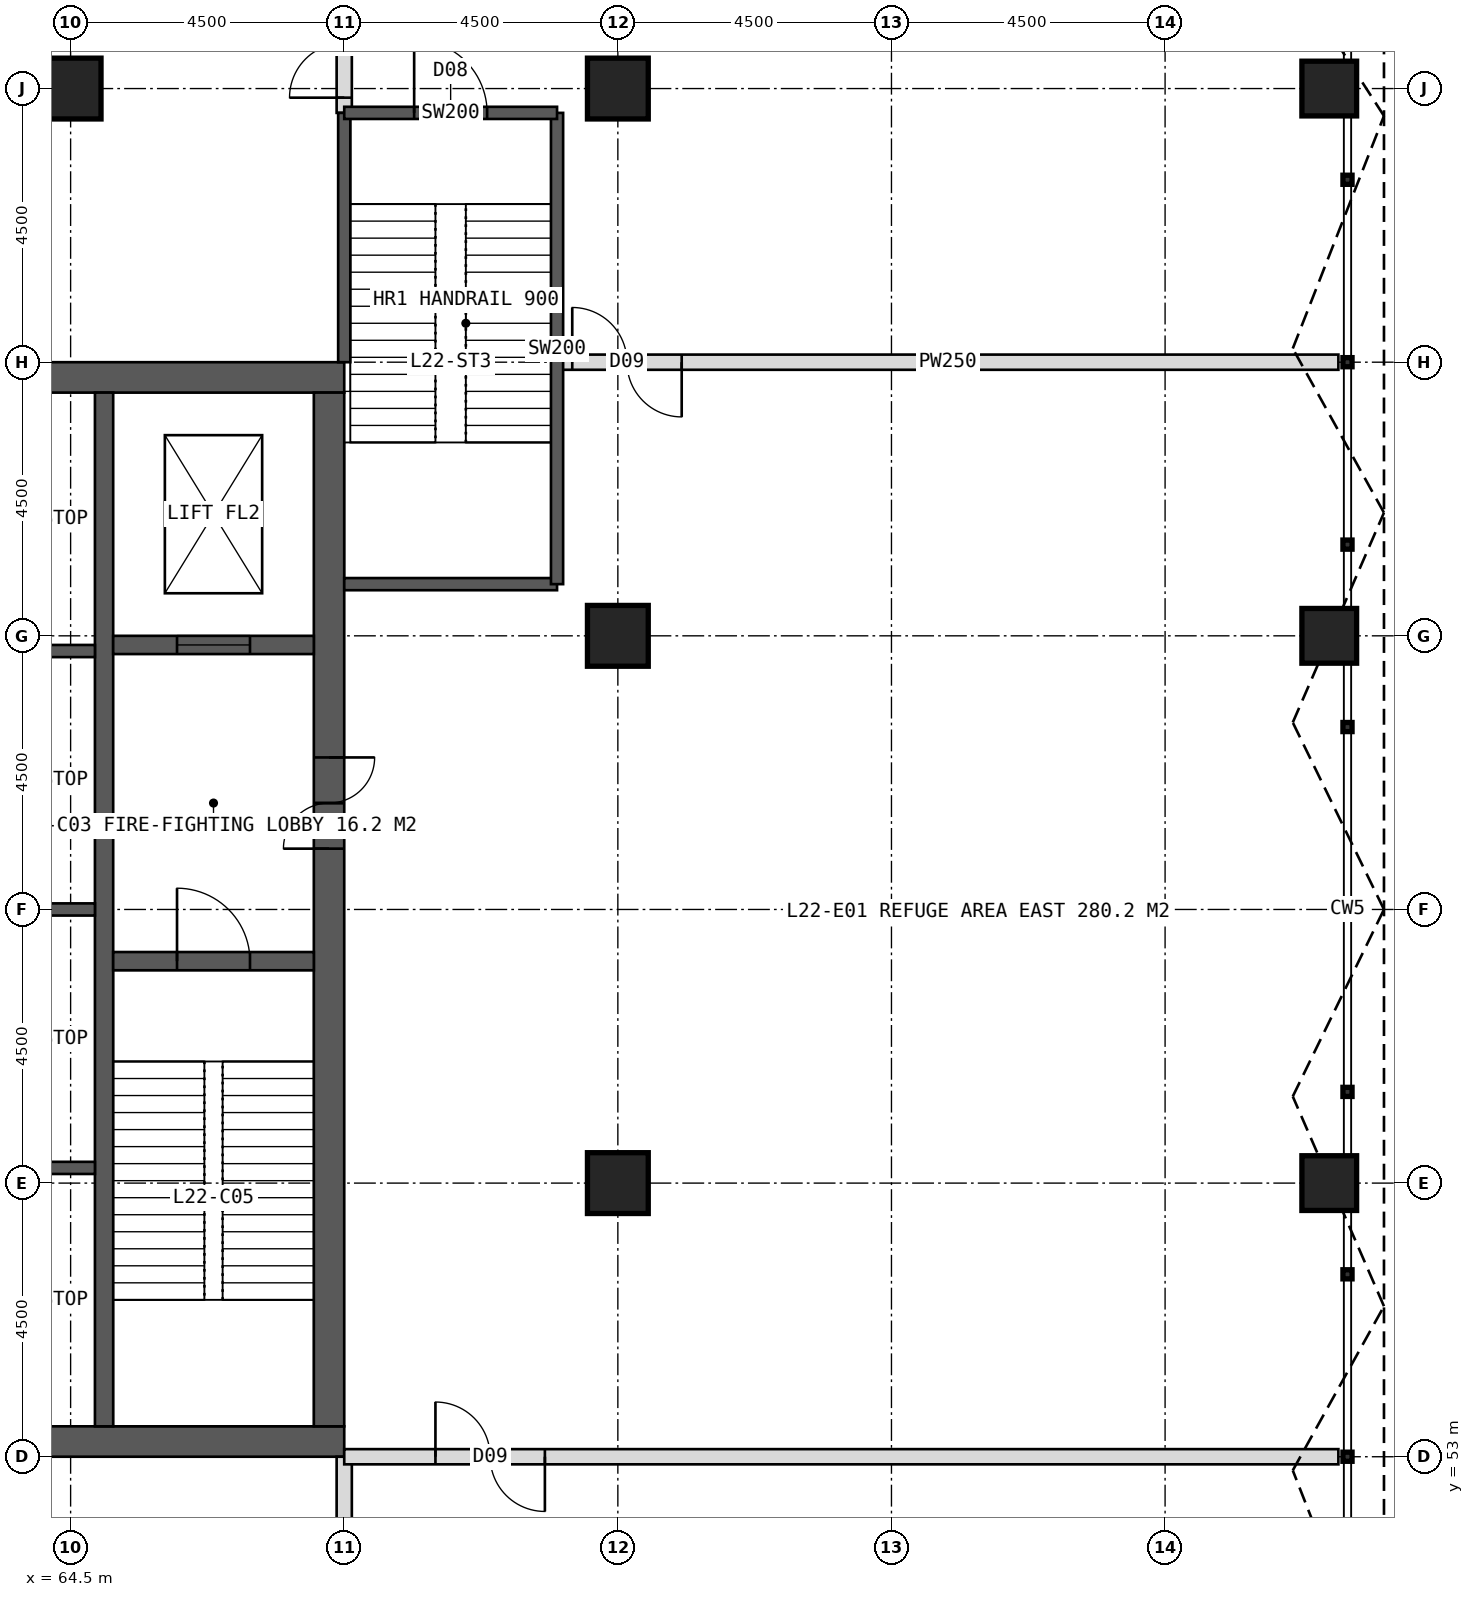
"""IFC4 building model, lengths in metres.
Left out: names, types, materials, properties, quantities, classifications, styles, units other than length and angle.
Written with IfcOpenShell. Run it as: python <this file> out.ifc"""

import sys

from ifc_helpers import new_model, si_unit, direction, frame, frame_2d, origin, origin_2d, place, context, subcontext, project, spatial, rectangle, hollow_rectangle, extrude, element, fill, save


model = new_model("IFC4")
c1 = context("Model", 3, precision=1e-05, world=origin(), true_north=direction((0.0, 1.0)))
c2 = subcontext(c1, "Body", "Model", "MODEL_VIEW")
j1 = project(units=[si_unit("LENGTHUNIT", "METRE"), si_unit("PLANEANGLEUNIT", "RADIAN")], contexts=[c1])
p1 = place(None, origin())
s1 = spatial("IfcSite", under=j1, at=p1, CompositionType="ELEMENT")
p2 = place(p1, origin())
s2 = spatial("IfcBuilding", under=s1, at=p2, CompositionType="ELEMENT")
p3 = place(p2, frame((0.0, 0.0, 95.0)))
s3 = spatial("IfcBuildingStorey", under=s2, at=p3, CompositionType="ELEMENT", Elevation=95.0)
p4 = place(p3, frame((51.0, 70.75, 0.0), z_axis=(0.0, 0.0, 1.0), x_axis=(1.0, 0.0, 0.0)))
e1 = element("IfcWall", 1, at=p4, inside=s3, PredefinedType="SHEAR", context=c2, shape_type="SweptSolid", body=[
    extrude(rectangle(XDim=18.0, YDim=0.5, at=frame_2d((9.0, 0.0))), origin(), (0.0, 0.0, 1.0), 5.0),
])
p5 = place(p4, frame((8.1, 0.0, 0.0)))
e2 = element("IfcOpeningElement", 2, at=p5, cuts=e1, PredefinedType="OPENING", context=c2, shape_type="SweptSolid", body=[
    extrude(rectangle(XDim=1.8, YDim=2.2, at=frame_2d((0.9, 1.1))), frame((0.0, 0.26, 0.0), z_axis=(0.0, -1.0, 0.0), x_axis=(1.0, 0.0, 0.0)), (0.0, 0.0, 1.0), 0.52),
])
p6 = place(p3, frame((51.0, 53.25, 0.0), z_axis=(0.0, 0.0, 1.0), x_axis=(1.0, 0.0, 0.0)))
e3 = element("IfcWall", 3, at=p6, inside=s3, PredefinedType="SHEAR", context=c2, shape_type="SweptSolid", body=[
    extrude(rectangle(XDim=18.0, YDim=0.5, at=frame_2d((9.0, 0.0))), origin(), (0.0, 0.0, 1.0), 5.0),
])
p7 = place(p6, frame((8.1, 0.0, 0.0)))
e4 = element("IfcOpeningElement", 4, at=p7, cuts=e3, PredefinedType="OPENING", context=c2, shape_type="SweptSolid", body=[
    extrude(rectangle(XDim=1.8, YDim=2.2, at=frame_2d((0.9, 1.1))), frame((0.0, 0.26, 0.0), z_axis=(0.0, -1.0, 0.0), x_axis=(1.0, 0.0, 0.0)), (0.0, 0.0, 1.0), 0.52),
])
p8 = place(p3, frame((68.75, 53.5, 0.0), z_axis=(0.0, 0.0, 1.0), x_axis=(0.0, 1.0, 0.0)))
e5 = element("IfcWall", 5, at=p8, inside=s3, PredefinedType="SHEAR", context=c2, shape_type="SweptSolid", body=[
    extrude(rectangle(XDim=17.0, YDim=0.5, at=frame_2d((8.5, 0.0))), origin(), (0.0, 0.0, 1.0), 5.0),
])
p9 = place(p8, frame((9.5, 0.0, 0.0)))
e6 = element("IfcOpeningElement", 6, at=p9, cuts=e5, PredefinedType="OPENING", context=c2, shape_type="SweptSolid", body=[
    extrude(rectangle(XDim=1.5, YDim=2.2, at=frame_2d((0.75, 1.1))), frame((0.0, 0.26, 0.0), z_axis=(0.0, -1.0, 0.0), x_axis=(1.0, 0.0, 0.0)), (0.0, 0.0, 1.0), 0.52),
])
p10 = place(p3, frame((65.05, 53.5, 0.0), z_axis=(0.0, 0.0, 1.0), x_axis=(0.0, 1.0, 0.0)))
e7 = element("IfcWall", 7, at=p10, inside=s3, PredefinedType="SHEAR", context=c2, shape_type="SweptSolid", body=[
    extrude(rectangle(XDim=17.0, YDim=0.3, at=frame_2d((8.5, 0.0))), origin(), (0.0, 0.0, 1.0), 5.0),
])
for number, where, z_axis, x_axis in (
    (8, (61.85, 57.75, 0.0), (0.0, 0.0, 1.0), (1.0, 0.0, 0.0)),
    (9, (61.85, 62.0, 0.0), (0.0, 0.0, 1.0), (1.0, 0.0, 0.0)),
    (10, (61.85, 66.25, 0.0), (0.0, 0.0, 1.0), (1.0, 0.0, 0.0)),
):
    element("IfcWall", number, at=place(p3, frame(where, z_axis=z_axis, x_axis=x_axis)), inside=s3, PredefinedType="SHEAR", context=c2, shape_type="SweptSolid", body=[
        extrude(rectangle(XDim=3.05, YDim=0.2, at=frame_2d((1.525, 0.0))), origin(), (0.0, 0.0, 1.0), 5.0),
    ])
p11 = place(p3, frame((65.2, 61.15, 0.0), z_axis=(0.0, 0.0, 1.0), x_axis=(1.0, 0.0, 0.0)))
e11 = element("IfcWall", 11, at=p11, inside=s3, PredefinedType="SHEAR", context=c2, shape_type="SweptSolid", body=[
    extrude(rectangle(XDim=3.3, YDim=0.3, at=frame_2d((1.65, 0.0))), origin(), (0.0, 0.0, 1.0), 5.0),
])
p12 = place(p11, frame((1.05, 0.0, 0.0)))
e12 = element("IfcOpeningElement", 12, at=p12, cuts=e11, PredefinedType="OPENING", context=c2, shape_type="SweptSolid", body=[
    extrude(rectangle(XDim=1.2, YDim=2.1, at=frame_2d((0.6, 1.05))), frame((0.0, 0.16, 0.0), z_axis=(0.0, -1.0, 0.0), x_axis=(1.0, 0.0, 0.0)), (0.0, 0.0, 1.0), 0.32),
])
p13 = place(p3, frame((65.2, 66.35, 0.0), z_axis=(0.0, 0.0, 1.0), x_axis=(1.0, 0.0, 0.0)))
e13 = element("IfcWall", 13, at=p13, inside=s3, PredefinedType="SHEAR", context=c2, shape_type="SweptSolid", body=[
    extrude(rectangle(XDim=3.3, YDim=0.3, at=frame_2d((1.65, 0.0))), origin(), (0.0, 0.0, 1.0), 5.0),
])
p14 = place(p13, frame((1.05, 0.0, 0.0)))
e14 = element("IfcOpeningElement", 14, at=p14, cuts=e13, PredefinedType="OPENING", context=c2, shape_type="SweptSolid", body=[
    extrude(rectangle(XDim=1.2, YDim=2.2, at=frame_2d((0.6, 1.1))), frame((0.0, 0.16, 0.0), z_axis=(0.0, -1.0, 0.0), x_axis=(1.0, 0.0, 0.0)), (0.0, 0.0, 1.0), 0.32),
])
for number, where, z_axis, x_axis in (
    (15, (73.5, 75.5, 0.0), (0.0, 0.0, 1.0), (1.0, 0.0, 0.0)),
    (16, (64.5, 75.5, 0.0), (0.0, 0.0, 1.0), (1.0, 0.0, 0.0)),
    (17, (73.5, 57.5, 0.0), (0.0, 0.0, 1.0), (1.0, 0.0, 0.0)),
    (18, (73.5, 66.5, 0.0), (0.0, 0.0, 1.0), (1.0, 0.0, 0.0)),
):
    element("IfcColumn", number, at=place(p3, frame(where, z_axis=z_axis, x_axis=x_axis)), inside=s3, PredefinedType="COLUMN", context=c2, shape_type="SweptSolid", body=[
        extrude(hollow_rectangle(XDim=1.0, YDim=1.0, WallThickness=0.1, at=origin_2d()), origin(), (0.0, 0.0, 1.0), 5.0),
    ])
for number, where, z_axis, x_axis in (
    (19, (85.2, 57.5, 0.0), (0.0, 0.0, 1.0), (1.0, 0.0, 0.0)),
    (20, (85.2, 66.5, 0.0), (0.0, 0.0, 1.0), (1.0, 0.0, 0.0)),
    (21, (85.2, 75.5, 0.0), (0.0, 0.0, 1.0), (1.0, 0.0, 0.0)),
):
    element("IfcColumn", number, at=place(p3, frame(where, z_axis=z_axis, x_axis=x_axis)), inside=s3, PredefinedType="COLUMN", context=c2, shape_type="SweptSolid", body=[
        extrude(hollow_rectangle(XDim=0.9, YDim=0.9, WallThickness=0.08, at=origin_2d()), origin(), (0.0, 0.0, 1.0), 5.0),
    ])
p15 = place(p3, frame((69.0, 75.1, 0.0), z_axis=(0.0, 0.0, 1.0), x_axis=(0.0, 1.0, 0.0)))
e22 = element("IfcWall", 22, at=p15, inside=s3, PredefinedType="SOLIDWALL", context=c2, shape_type="SweptSolid", body=[
    extrude(rectangle(XDim=12.25, YDim=0.25, at=frame_2d((6.125, 0.0))), origin(), (0.0, 0.0, 1.0), 4.75),
])
p16 = place(p15, frame((0.25, 0.0, 0.0)))
e23 = element("IfcOpeningElement", 23, at=p16, cuts=e22, PredefinedType="OPENING", context=c2, shape_type="SweptSolid", body=[
    extrude(rectangle(XDim=1.8, YDim=2.2, at=frame_2d((0.9, 1.1))), frame((0.0, 0.135, 0.0), z_axis=(0.0, -1.0, 0.0), x_axis=(1.0, 0.0, 0.0)), (0.0, 0.0, 1.0), 0.27),
])
p17 = place(p3, frame((69.0, 53.0, 0.0), z_axis=(0.0, 0.0, 1.0), x_axis=(0.0, -1.0, 0.0)))
e24 = element("IfcWall", 24, at=p17, inside=s3, PredefinedType="SOLIDWALL", context=c2, shape_type="SweptSolid", body=[
    extrude(rectangle(XDim=16.35, YDim=0.25, at=frame_2d((8.175, 0.0))), origin(), (0.0, 0.0, 1.0), 4.75),
])
p18 = place(p17, frame((1.5, 0.0, 0.0)))
e25 = element("IfcOpeningElement", 25, at=p18, cuts=e24, PredefinedType="OPENING", context=c2, shape_type="SweptSolid", body=[
    extrude(rectangle(XDim=1.8, YDim=2.2, at=frame_2d((0.9, 1.1))), frame((0.0, 0.135, 0.0), z_axis=(0.0, -1.0, 0.0), x_axis=(1.0, 0.0, 0.0)), (0.0, 0.0, 1.0), 0.27),
])
p19 = place(p3, frame((69.0, 53.0, 0.0), z_axis=(0.0, 0.0, 1.0), x_axis=(1.0, 0.0, 0.0)))
e26 = element("IfcWall", 26, at=p19, inside=s3, PredefinedType="SOLIDWALL", context=c2, shape_type="SweptSolid", body=[
    extrude(rectangle(XDim=16.35, YDim=0.25, at=frame_2d((8.175, 0.0))), origin(), (0.0, 0.0, 1.0), 4.75),
])
p20 = place(p19, frame((1.5, 0.0, 0.0)))
e27 = element("IfcOpeningElement", 27, at=p20, cuts=e26, PredefinedType="OPENING", context=c2, shape_type="SweptSolid", body=[
    extrude(rectangle(XDim=1.8, YDim=2.2, at=frame_2d((0.9, 1.1))), frame((0.0, 0.135, 0.0), z_axis=(0.0, -1.0, 0.0), x_axis=(1.0, 0.0, 0.0)), (0.0, 0.0, 1.0), 0.27),
])
p21 = place(p3, frame((72.5, 71.0, 0.0), z_axis=(0.0, 0.0, 1.0), x_axis=(1.0, 0.0, 0.0)))
e28 = element("IfcWall", 28, at=p21, inside=s3, PredefinedType="SOLIDWALL", context=c2, shape_type="SweptSolid", body=[
    extrude(rectangle(XDim=12.85, YDim=0.25, at=frame_2d((6.425, 0.0))), origin(), (0.0, 0.0, 1.0), 4.75),
])
p22 = place(p21, frame((0.25, 0.0, 0.0)))
e29 = element("IfcOpeningElement", 29, at=p22, cuts=e28, PredefinedType="OPENING", context=c2, shape_type="SweptSolid", body=[
    extrude(rectangle(XDim=1.8, YDim=2.2, at=frame_2d((0.9, 1.1))), frame((0.0, 0.135, 0.0), z_axis=(0.0, -1.0, 0.0), x_axis=(1.0, 0.0, 0.0)), (0.0, 0.0, 1.0), 0.27),
])
p23 = place(p3, frame((69.0, 71.0, 0.0), z_axis=(0.0, 0.0, 1.0), x_axis=(0.0, 1.0, 0.0)))
e30 = element("IfcWall", 30, at=p23, inside=s3, PredefinedType="SOLIDWALL", context=c2, shape_type="SweptSolid", body=[
    extrude(rectangle(XDim=4.1, YDim=0.2, at=frame_2d((2.05, 0.0))), origin(), (0.0, 0.0, 1.0), 4.75),
])
p24 = place(p3, frame((69.0, 67.35, 0.0), z_axis=(0.0, 0.0, 1.0), x_axis=(1.0, 0.0, 0.0)))
e31 = element("IfcWall", 31, at=p24, inside=s3, PredefinedType="SOLIDWALL", context=c2, shape_type="SweptSolid", body=[
    extrude(rectangle(XDim=3.5, YDim=0.2, at=frame_2d((1.75, 0.0))), origin(), (0.0, 0.0, 1.0), 4.75),
])
p25 = place(p3, frame((72.5, 67.35, 0.0), z_axis=(0.0, 0.0, 1.0), x_axis=(0.0, 1.0, 0.0)))
e32 = element("IfcWall", 32, at=p25, inside=s3, PredefinedType="SOLIDWALL", context=c2, shape_type="SweptSolid", body=[
    extrude(rectangle(XDim=7.75, YDim=0.2, at=frame_2d((3.875, 0.0))), origin(), (0.0, 0.0, 1.0), 4.75),
])
p26 = place(p3, frame((69.0, 75.1, 0.0), z_axis=(0.0, 0.0, 1.0), x_axis=(1.0, 0.0, 0.0)))
e33 = element("IfcWall", 33, at=p26, inside=s3, PredefinedType="SOLIDWALL", context=c2, shape_type="SweptSolid", body=[
    extrude(rectangle(XDim=3.5, YDim=0.2, at=frame_2d((1.75, 0.0))), origin(), (0.0, 0.0, 1.0), 4.75),
])
p27 = place(p26, frame((1.15, 0.0, 0.0)))
e34 = element("IfcOpeningElement", 34, at=p27, cuts=e33, PredefinedType="OPENING", context=c2, shape_type="SweptSolid", body=[
    extrude(rectangle(XDim=1.2, YDim=2.1, at=frame_2d((0.6, 1.05))), frame((0.0, 0.11, 0.0), z_axis=(0.0, -1.0, 0.0), x_axis=(1.0, 0.0, 0.0)), (0.0, 0.0, 1.0), 0.22),
])
p28 = place(p16, origin())
e35 = element("IfcDoor", 35, at=p28, inside=s3, OperationType="DOUBLE_DOOR_SINGLE_SWING", PredefinedType="DOOR", context=c2, shape_type="SweptSolid", body=[
    extrude(rectangle(XDim=1.8, YDim=2.2, at=frame_2d((0.9, 1.1))), frame((0.0, 0.025, 0.0), z_axis=(0.0, -1.0, 0.0), x_axis=(1.0, 0.0, 0.0)), (0.0, 0.0, 1.0), 0.05),
])
fill(e23, e35)
p29 = place(p20, origin())
e36 = element("IfcDoor", 36, at=p29, inside=s3, OperationType="DOUBLE_DOOR_SINGLE_SWING", PredefinedType="DOOR", context=c2, shape_type="SweptSolid", body=[
    extrude(rectangle(XDim=1.8, YDim=2.2, at=frame_2d((0.9, 1.1))), frame((0.0, 0.025, 0.0), z_axis=(0.0, -1.0, 0.0), x_axis=(1.0, 0.0, 0.0)), (0.0, 0.0, 1.0), 0.05),
])
fill(e27, e36)
p30 = place(p22, origin())
e37 = element("IfcDoor", 37, at=p30, inside=s3, OperationType="DOUBLE_DOOR_SINGLE_SWING", PredefinedType="DOOR", context=c2, shape_type="SweptSolid", body=[
    extrude(rectangle(XDim=1.8, YDim=2.2, at=frame_2d((0.9, 1.1))), frame((0.0, 0.025, 0.0), z_axis=(0.0, -1.0, 0.0), x_axis=(1.0, 0.0, 0.0)), (0.0, 0.0, 1.0), 0.05),
])
fill(e29, e37)
p31 = place(p9, origin())
e38 = element("IfcDoor", 38, at=p31, inside=s3, OperationType="DOUBLE_DOOR_SINGLE_SWING", PredefinedType="DOOR", context=c2, shape_type="SweptSolid", body=[
    extrude(rectangle(XDim=1.5, YDim=2.2, at=frame_2d((0.75, 1.1))), frame((0.0, 0.025, 0.0), z_axis=(0.0, -1.0, 0.0), x_axis=(1.0, 0.0, 0.0)), (0.0, 0.0, 1.0), 0.05),
])
fill(e6, e38)
p32 = place(p12, origin())
e39 = element("IfcDoor", 39, at=p32, inside=s3, OperationType="SINGLE_SWING_LEFT", PredefinedType="DOOR", context=c2, shape_type="SweptSolid", body=[
    extrude(rectangle(XDim=1.2, YDim=2.1, at=frame_2d((0.6, 1.05))), frame((0.0, 0.025, 0.0), z_axis=(0.0, -1.0, 0.0), x_axis=(1.0, 0.0, 0.0)), (0.0, 0.0, 1.0), 0.05),
])
fill(e12, e39)
p33 = place(p14, origin())
e40 = element("IfcDoor", 40, at=p33, inside=s3, OperationType="SLIDING_TO_LEFT", PredefinedType="DOOR", context=c2, shape_type="SweptSolid", body=[
    extrude(rectangle(XDim=1.2, YDim=2.2, at=frame_2d((0.6, 1.1))), frame((0.0, 0.025, 0.0), z_axis=(0.0, -1.0, 0.0), x_axis=(1.0, 0.0, 0.0)), (0.0, 0.0, 1.0), 0.05),
])
fill(e14, e40)
p34 = place(p27, origin())
e41 = element("IfcDoor", 41, at=p34, inside=s3, OperationType="SINGLE_SWING_LEFT", PredefinedType="DOOR", context=c2, shape_type="SweptSolid", body=[
    extrude(rectangle(XDim=1.2, YDim=2.1, at=frame_2d((0.6, 1.05))), frame((0.0, 0.025, 0.0), z_axis=(0.0, -1.0, 0.0), x_axis=(1.0, 0.0, 0.0)), (0.0, 0.0, 1.0), 0.05),
])
fill(e34, e41)
save(model, sys.argv[1])
